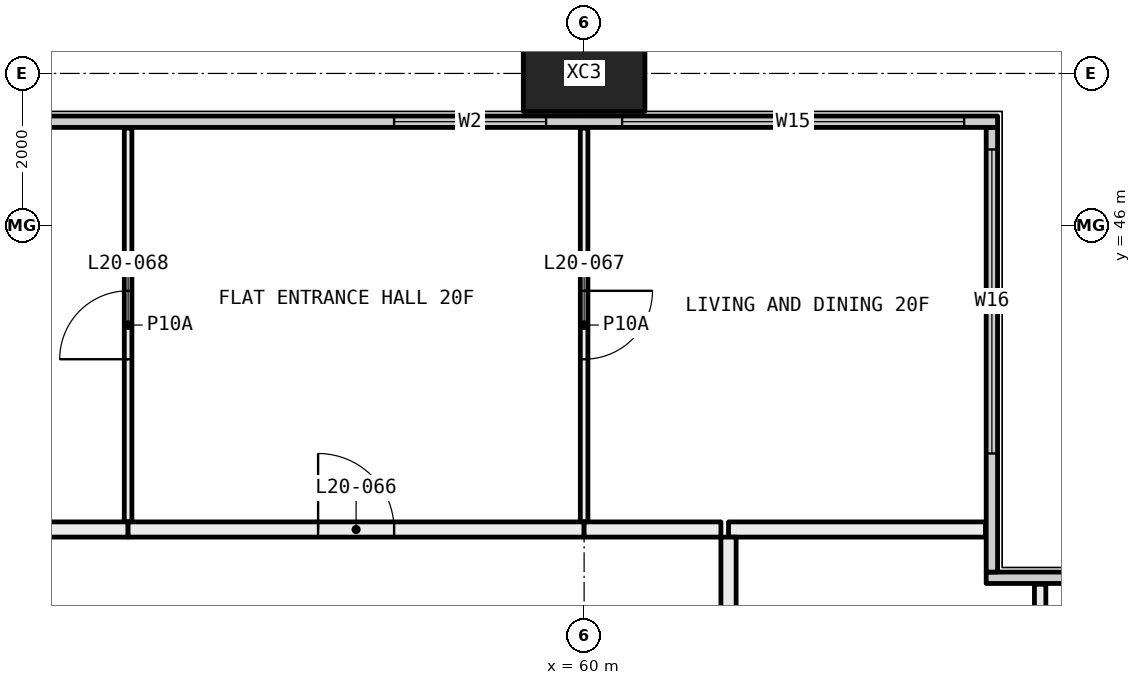
"""IFC4 building model, lengths in metres.
Left out: names, types, materials, properties, quantities, classifications, styles, units other than length and angle.
Written with IfcOpenShell. Run it as: python <this file> out.ifc"""

import sys

from ifc_helpers import new_model, si_unit, direction, frame, frame_2d, origin, origin_2d, place, context, subcontext, project, spatial, rectangle, hollow_rectangle, extrude, element, fill, save


model = new_model("IFC4")
c1 = context("Model", 3, precision=1e-05, world=origin(), true_north=direction((0.0, 1.0)))
c2 = subcontext(c1, "Body", "Model", "MODEL_VIEW")
j1 = project(units=[si_unit("LENGTHUNIT", "METRE"), si_unit("PLANEANGLEUNIT", "RADIAN")], contexts=[c1])
p1 = place(None, origin())
s1 = spatial("IfcSite", under=j1, at=p1, CompositionType="ELEMENT")
p2 = place(p1, origin())
s2 = spatial("IfcBuilding", under=s1, at=p2, CompositionType="ELEMENT")
p3 = place(p2, frame((0.0, 0.0, 81.75)))
s3 = spatial("IfcBuildingStorey", under=s2, at=p3, CompositionType="ELEMENT", Elevation=81.75)
p4 = place(p3, frame((60.0, 48.0, -0.4), z_axis=(0.0, 0.0, 1.0), x_axis=(1.0, 0.0, 0.0)))
e1 = element("IfcColumn", 1, at=p4, inside=s3, PredefinedType="COLUMN", context=c2, shape_type="SweptSolid", body=[
    extrude(hollow_rectangle(XDim=1.6, YDim=1.0, WallThickness=0.065, at=origin_2d()), origin(), (0.0, 0.0, 1.0), 3.45),
])
p5 = place(p3, frame((65.29, 41.365, 0.0), z_axis=(0.0, 0.0, 1.0), x_axis=(1.0, 0.0, 0.0)))
e2 = element("IfcWall", 2, at=p5, inside=s3, PredefinedType="ELEMENTEDWALL", context=c2, shape_type="SweptSolid", body=[
    extrude(rectangle(XDim=6.15, YDim=0.15, at=frame_2d((3.075, 0.0))), origin(), (0.0, 0.0, 1.0), 3.05),
])
p6 = place(p5, frame((1.71, 0.0, 0.45)))
e3 = element("IfcOpeningElement", 3, at=p6, cuts=e2, PredefinedType="OPENING", context=c2, shape_type="SweptSolid", body=[
    extrude(rectangle(XDim=4.0, YDim=2.55, at=frame_2d((2.0, 1.275))), frame((0.0, 0.085, 0.0), z_axis=(0.0, -1.0, 0.0), x_axis=(1.0, 0.0, 0.0)), (0.0, 0.0, 1.0), 0.17),
])
p7 = place(p3, frame((65.365, 41.44, 0.0), z_axis=(0.0, 0.0, 1.0), x_axis=(0.0, 1.0, 0.0)))
e4 = element("IfcWall", 4, at=p7, inside=s3, PredefinedType="ELEMENTEDWALL", context=c2, shape_type="SweptSolid", body=[
    extrude(rectangle(XDim=5.85, YDim=0.15, at=frame_2d((2.925, 0.0))), origin(), (0.0, 0.0, 1.0), 3.05),
])
p8 = place(p7, frame((1.56, 0.0, 0.45)))
e5 = element("IfcOpeningElement", 5, at=p8, cuts=e4, PredefinedType="OPENING", context=c2, shape_type="SweptSolid", body=[
    extrude(rectangle(XDim=4.0, YDim=2.55, at=frame_2d((2.0, 1.275))), frame((0.0, 0.085, 0.0), z_axis=(0.0, -1.0, 0.0), x_axis=(1.0, 0.0, 0.0)), (0.0, 0.0, 1.0), 0.17),
])
p9 = place(p3, frame((6.56, 47.365, 0.0), z_axis=(0.0, 0.0, 1.0), x_axis=(1.0, 0.0, 0.0)))
e6 = element("IfcWall", 6, at=p9, inside=s3, PredefinedType="ELEMENTEDWALL", context=c2, shape_type="SweptSolid", body=[
    extrude(rectangle(XDim=58.88, YDim=0.15, at=frame_2d((29.44, 0.0))), origin(), (0.0, 0.0, 1.0), 3.05),
])
p10 = place(p9, frame((0.44, 0.0, 0.45)))
e7 = element("IfcOpeningElement", 7, at=p10, cuts=e6, PredefinedType="OPENING", context=c2, shape_type="SweptSolid", body=[
    extrude(rectangle(XDim=4.5, YDim=2.55, at=frame_2d((2.25, 1.275))), frame((0.0, 0.085, 0.0), z_axis=(0.0, -1.0, 0.0), x_axis=(1.0, 0.0, 0.0)), (0.0, 0.0, 1.0), 0.17),
])
p11 = place(p9, frame((5.94, 0.0, 0.45)))
e8 = element("IfcOpeningElement", 8, at=p11, cuts=e6, PredefinedType="OPENING", context=c2, shape_type="SweptSolid", body=[
    extrude(rectangle(XDim=3.0, YDim=2.55, at=frame_2d((1.5, 1.275))), frame((0.0, 0.085, 0.0), z_axis=(0.0, -1.0, 0.0), x_axis=(1.0, 0.0, 0.0)), (0.0, 0.0, 1.0), 0.17),
])
p12 = place(p9, frame((13.94, 0.0, 0.45)))
e9 = element("IfcOpeningElement", 9, at=p12, cuts=e6, PredefinedType="OPENING", context=c2, shape_type="SweptSolid", body=[
    extrude(rectangle(XDim=3.0, YDim=2.55, at=frame_2d((1.5, 1.275))), frame((0.0, 0.085, 0.0), z_axis=(0.0, -1.0, 0.0), x_axis=(1.0, 0.0, 0.0)), (0.0, 0.0, 1.0), 0.17),
])
p13 = place(p9, frame((17.94, 0.0, 0.45)))
e10 = element("IfcOpeningElement", 10, at=p13, cuts=e6, PredefinedType="OPENING", context=c2, shape_type="SweptSolid", body=[
    extrude(rectangle(XDim=3.0, YDim=2.55, at=frame_2d((1.5, 1.275))), frame((0.0, 0.085, 0.0), z_axis=(0.0, -1.0, 0.0), x_axis=(1.0, 0.0, 0.0)), (0.0, 0.0, 1.0), 0.17),
])
p14 = place(p9, frame((26.94, 0.0, 0.45)))
e11 = element("IfcOpeningElement", 11, at=p14, cuts=e6, PredefinedType="OPENING", context=c2, shape_type="SweptSolid", body=[
    extrude(rectangle(XDim=2.0, YDim=2.55, at=frame_2d((1.0, 1.275))), frame((0.0, 0.085, 0.0), z_axis=(0.0, -1.0, 0.0), x_axis=(1.0, 0.0, 0.0)), (0.0, 0.0, 1.0), 0.17),
])
p15 = place(p9, frame((29.94, 0.0, 0.45)))
e12 = element("IfcOpeningElement", 12, at=p15, cuts=e6, PredefinedType="OPENING", context=c2, shape_type="SweptSolid", body=[
    extrude(rectangle(XDim=3.0, YDim=2.55, at=frame_2d((1.5, 1.275))), frame((0.0, 0.085, 0.0), z_axis=(0.0, -1.0, 0.0), x_axis=(1.0, 0.0, 0.0)), (0.0, 0.0, 1.0), 0.17),
])
p16 = place(p9, frame((37.94, 0.0, 0.45)))
e13 = element("IfcOpeningElement", 13, at=p16, cuts=e6, PredefinedType="OPENING", context=c2, shape_type="SweptSolid", body=[
    extrude(rectangle(XDim=3.0, YDim=2.55, at=frame_2d((1.5, 1.275))), frame((0.0, 0.085, 0.0), z_axis=(0.0, -1.0, 0.0), x_axis=(1.0, 0.0, 0.0)), (0.0, 0.0, 1.0), 0.17),
])
p17 = place(p9, frame((41.94, 0.0, 0.45)))
e14 = element("IfcOpeningElement", 14, at=p17, cuts=e6, PredefinedType="OPENING", context=c2, shape_type="SweptSolid", body=[
    extrude(rectangle(XDim=3.0, YDim=2.55, at=frame_2d((1.5, 1.275))), frame((0.0, 0.085, 0.0), z_axis=(0.0, -1.0, 0.0), x_axis=(1.0, 0.0, 0.0)), (0.0, 0.0, 1.0), 0.17),
])
p18 = place(p9, frame((50.94, 0.0, 0.45)))
e15 = element("IfcOpeningElement", 15, at=p18, cuts=e6, PredefinedType="OPENING", context=c2, shape_type="SweptSolid", body=[
    extrude(rectangle(XDim=2.0, YDim=2.55, at=frame_2d((1.0, 1.275))), frame((0.0, 0.085, 0.0), z_axis=(0.0, -1.0, 0.0), x_axis=(1.0, 0.0, 0.0)), (0.0, 0.0, 1.0), 0.17),
])
p19 = place(p9, frame((53.94, 0.0, 0.45)))
e16 = element("IfcOpeningElement", 16, at=p19, cuts=e6, PredefinedType="OPENING", context=c2, shape_type="SweptSolid", body=[
    extrude(rectangle(XDim=4.5, YDim=2.55, at=frame_2d((2.25, 1.275))), frame((0.0, 0.085, 0.0), z_axis=(0.0, -1.0, 0.0), x_axis=(1.0, 0.0, 0.0)), (0.0, 0.0, 1.0), 0.17),
])
p20 = place(p3, frame((66.0, 41.28, 0.0), z_axis=(0.0, 0.0, 1.0), x_axis=(0.0, -1.0, 0.0)))
e17 = element("IfcWall", 17, at=p20, inside=s3, PredefinedType="PARTITIONING", context=c2, shape_type="SweptSolid", body=[
    extrude(rectangle(XDim=2.28, YDim=0.15, at=frame_2d((1.14, 0.0))), origin(), (0.0, 0.0, 1.0), 3.05),
])
p21 = place(p3, frame((65.28, 42.0, 0.0), z_axis=(0.0, 0.0, 1.0), x_axis=(-1.0, 0.0, 0.0)))
e18 = element("IfcWall", 18, at=p21, inside=s3, PredefinedType="PARTITIONING", context=c2, shape_type="SweptSolid", body=[
    extrude(rectangle(XDim=3.38, YDim=0.2, at=frame_2d((1.69, 0.0))), origin(), (0.0, 0.0, 1.0), 3.05),
])
p22 = place(p3, frame((61.9, 41.9, 0.0), z_axis=(0.0, 0.0, 1.0), x_axis=(0.0, -1.0, 0.0)))
e19 = element("IfcWall", 19, at=p22, inside=s3, PredefinedType="PARTITIONING", context=c2, shape_type="SweptSolid", body=[
    extrude(rectangle(XDim=2.9, YDim=0.2, at=frame_2d((1.45, 0.0))), origin(), (0.0, 0.0, 1.0), 3.05),
])
p23 = place(p3, frame((54.0, 42.1, 0.0), z_axis=(0.0, 0.0, 1.0), x_axis=(0.0, 1.0, 0.0)))
e20 = element("IfcWall", 20, at=p23, inside=s3, PredefinedType="PARTITIONING", context=c2, shape_type="SweptSolid", body=[
    extrude(rectangle(XDim=5.18, YDim=0.1, at=frame_2d((2.59, 0.0))), origin(), (0.0, 0.0, 1.0), 3.05),
])
p24 = place(p23, frame((2.14, 0.0, 0.0)))
e21 = element("IfcOpeningElement", 21, at=p24, cuts=e20, PredefinedType="OPENING", context=c2, shape_type="SweptSolid", body=[
    extrude(rectangle(XDim=0.9, YDim=2.1, at=frame_2d((0.45, 1.05))), frame((0.0, 0.06, 0.0), z_axis=(0.0, -1.0, 0.0), x_axis=(1.0, 0.0, 0.0)), (0.0, 0.0, 1.0), 0.12),
])
p25 = place(p3, frame((48.0, 42.0, 0.0), z_axis=(0.0, 0.0, 1.0), x_axis=(1.0, 0.0, 0.0)))
e22 = element("IfcWall", 22, at=p25, inside=s3, PredefinedType="PARTITIONING", context=c2, shape_type="SweptSolid", body=[
    extrude(rectangle(XDim=6.0, YDim=0.2, at=frame_2d((3.0, 0.0))), origin(), (0.0, 0.0, 1.0), 3.05),
])
p26 = place(p3, frame((60.0, 42.1, 0.0), z_axis=(0.0, 0.0, 1.0), x_axis=(0.0, 1.0, 0.0)))
e23 = element("IfcWall", 23, at=p26, inside=s3, PredefinedType="PARTITIONING", context=c2, shape_type="SweptSolid", body=[
    extrude(rectangle(XDim=5.18, YDim=0.1, at=frame_2d((2.59, 0.0))), origin(), (0.0, 0.0, 1.0), 3.05),
])
p27 = place(p26, frame((2.14, 0.0, 0.0)))
e24 = element("IfcOpeningElement", 24, at=p27, cuts=e23, PredefinedType="OPENING", context=c2, shape_type="SweptSolid", body=[
    extrude(rectangle(XDim=0.9, YDim=2.1, at=frame_2d((0.45, 1.05))), frame((0.0, 0.06, 0.0), z_axis=(0.0, -1.0, 0.0), x_axis=(1.0, 0.0, 0.0)), (0.0, 0.0, 1.0), 0.12),
])
p28 = place(p3, frame((54.0, 42.0, 0.0), z_axis=(0.0, 0.0, 1.0), x_axis=(1.0, 0.0, 0.0)))
e25 = element("IfcWall", 25, at=p28, inside=s3, PredefinedType="PARTITIONING", context=c2, shape_type="SweptSolid", body=[
    extrude(rectangle(XDim=6.0, YDim=0.2, at=frame_2d((3.0, 0.0))), origin(), (0.0, 0.0, 1.0), 3.05),
])
p29 = place(p28, frame((2.5, 0.0, 0.0)))
e26 = element("IfcOpeningElement", 26, at=p29, cuts=e25, PredefinedType="OPENING", context=c2, shape_type="SweptSolid", body=[
    extrude(rectangle(XDim=1.0, YDim=2.1, at=frame_2d((0.5, 1.05))), frame((0.0, 0.11, 0.0), z_axis=(0.0, -1.0, 0.0), x_axis=(1.0, 0.0, 0.0)), (0.0, 0.0, 1.0), 0.22),
])
p30 = place(p3, frame((60.0, 42.0, 0.0), z_axis=(0.0, 0.0, 1.0), x_axis=(1.0, 0.0, 0.0)))
e27 = element("IfcWall", 27, at=p30, inside=s3, PredefinedType="PARTITIONING", context=c2, shape_type="SweptSolid", body=[
    extrude(rectangle(XDim=1.8, YDim=0.2, at=frame_2d((0.9, 0.0))), origin(), (0.0, 0.0, 1.0), 3.05),
])
p31 = place(p8, origin())
e28 = element("IfcWindow", 28, at=p31, inside=s3, PartitioningType="SINGLE_PANEL", PredefinedType="WINDOW", context=c2, shape_type="SweptSolid", body=[
    extrude(rectangle(XDim=4.0, YDim=2.55, at=frame_2d((2.0, 1.275))), frame((0.0, 0.03, 0.0), z_axis=(0.0, -1.0, 0.0), x_axis=(1.0, 0.0, 0.0)), (0.0, 0.0, 1.0), 0.06),
])
fill(e5, e28)
p32 = place(p18, origin())
e29 = element("IfcWindow", 29, at=p32, inside=s3, PartitioningType="SINGLE_PANEL", PredefinedType="WINDOW", context=c2, shape_type="SweptSolid", body=[
    extrude(rectangle(XDim=2.0, YDim=2.55, at=frame_2d((1.0, 1.275))), frame((0.0, 0.03, 0.0), z_axis=(0.0, -1.0, 0.0), x_axis=(1.0, 0.0, 0.0)), (0.0, 0.0, 1.0), 0.06),
])
fill(e15, e29)
p33 = place(p19, origin())
e30 = element("IfcWindow", 30, at=p33, inside=s3, PartitioningType="SINGLE_PANEL", PredefinedType="WINDOW", context=c2, shape_type="SweptSolid", body=[
    extrude(rectangle(XDim=4.5, YDim=2.55, at=frame_2d((2.25, 1.275))), frame((0.0, 0.03, 0.0), z_axis=(0.0, -1.0, 0.0), x_axis=(1.0, 0.0, 0.0)), (0.0, 0.0, 1.0), 0.06),
])
fill(e16, e30)
p34 = place(p29, origin())
e31 = element("IfcDoor", 31, at=p34, inside=s3, OperationType="SINGLE_SWING_RIGHT", PredefinedType="DOOR", context=c2, shape_type="SweptSolid", body=[
    extrude(rectangle(XDim=1.0, YDim=2.1, at=frame_2d((0.5, 1.05))), frame((0.0, 0.025, 0.0), z_axis=(0.0, -1.0, 0.0), x_axis=(1.0, 0.0, 0.0)), (0.0, 0.0, 1.0), 0.05),
])
fill(e26, e31)
p35 = place(p27, frame((0.9, 0.0, 0.0), x_axis=(-1.0, 0.0, 0.0)))
e32 = element("IfcDoor", 32, at=p35, inside=s3, OperationType="SINGLE_SWING_RIGHT", PredefinedType="DOOR", context=c2, shape_type="SweptSolid", body=[
    extrude(rectangle(XDim=0.9, YDim=2.1, at=frame_2d((0.45, 1.05))), frame((0.0, 0.025, 0.0), z_axis=(0.0, -1.0, 0.0), x_axis=(1.0, 0.0, 0.0)), (0.0, 0.0, 1.0), 0.05),
])
fill(e24, e32)
p36 = place(p24, origin())
e33 = element("IfcDoor", 33, at=p36, inside=s3, OperationType="SINGLE_SWING_RIGHT", PredefinedType="DOOR", context=c2, shape_type="SweptSolid", body=[
    extrude(rectangle(XDim=0.9, YDim=2.1, at=frame_2d((0.45, 1.05))), frame((0.0, 0.025, 0.0), z_axis=(0.0, -1.0, 0.0), x_axis=(1.0, 0.0, 0.0)), (0.0, 0.0, 1.0), 0.05),
])
fill(e21, e33)
save(model, sys.argv[1])
